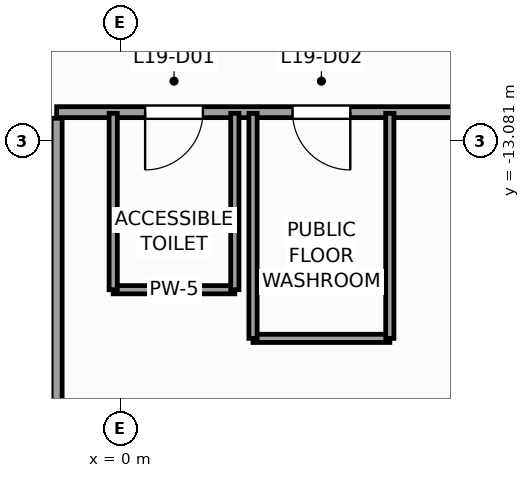
"""IFC4 building model, lengths in metres.
Left out: names, types, materials, properties, quantities, classifications, styles, units other than length and angle.
Written with IfcOpenShell. Run it as: python <this file> out.ifc"""

import sys

from ifc_helpers import new_model, si_unit, direction, frame, frame_2d, origin, place, context, subcontext, project, spatial, rectangle, extrude, source, transform, mapped, element, fill, save


model = new_model("IFC4")
c1 = context("Model", 3, precision=1e-05, world=origin(), true_north=direction((0.0, 1.0)))
c2 = subcontext(c1, "Body", "Model", "MODEL_VIEW")
j1 = project(units=[si_unit("LENGTHUNIT", "METRE"), si_unit("PLANEANGLEUNIT", "RADIAN")], contexts=[c1])
p1 = place(None, origin())
s1 = spatial("IfcSite", under=j1, at=p1, CompositionType="ELEMENT")
p2 = place(p1, origin())
s2 = spatial("IfcBuilding", under=s1, at=p2, CompositionType="ELEMENT")
p3 = place(p2, frame((0.0, 0.0, 83.2)))
s3 = spatial("IfcBuildingStorey", under=s2, at=p3, CompositionType="ELEMENT", Elevation=83.2)
p4 = place(p3, frame((-1.05, -12.6, 0.0), z_axis=(0.0, 0.0, 1.0), x_axis=(1.0, 0.0, 0.0)))
e1 = element("IfcWall", 1, at=p4, inside=s3, PredefinedType="PARTITIONING", context=c2, shape_type="SweptSolid", body=[
    extrude(rectangle(XDim=11.5, YDim=0.18, at=frame_2d((5.75, 0.0))), origin(), (0.0, 0.0, 1.0), 3.74),
])
p5 = place(p4, frame((1.455, 0.0, 0.0)))
e2 = element("IfcOpeningElement", 2, at=p5, cuts=e1, PredefinedType="OPENING", context=c2, shape_type="SweptSolid", body=[
    extrude(rectangle(XDim=0.95, YDim=2.1, at=frame_2d((0.475, 1.05))), frame((0.0, 0.1, 0.0), z_axis=(0.0, -1.0, 0.0), x_axis=(1.0, 0.0, 0.0)), (0.0, 0.0, 1.0), 0.2),
])
p6 = place(p4, frame((3.879, 0.0, 0.0)))
e3 = element("IfcOpeningElement", 3, at=p6, cuts=e1, PredefinedType="OPENING", context=c2, shape_type="SweptSolid", body=[
    extrude(rectangle(XDim=0.95, YDim=2.1, at=frame_2d((0.475, 1.05))), frame((0.0, 0.1, 0.0), z_axis=(0.0, -1.0, 0.0), x_axis=(1.0, 0.0, 0.0)), (0.0, 0.0, 1.0), 0.2),
])
p7 = place(p3, frame((-1.05, -28.487, 0.0), z_axis=(0.0, 0.0, 1.0), x_axis=(0.0, 1.0, 0.0)))
e4 = element("IfcWall", 4, at=p7, inside=s3, PredefinedType="PARTITIONING", context=c2, shape_type="SweptSolid", body=[
    extrude(rectangle(XDim=15.787, YDim=0.18, at=frame_2d((7.894, 0.0))), origin(), (0.0, 0.0, 1.0), 3.74),
])
p8 = place(p3, frame((-0.12, -15.52, 0.0), z_axis=(0.0, 0.0, 1.0), x_axis=(1.0, 0.0, 0.0)))
e5 = element("IfcWall", 5, at=p8, inside=s3, PredefinedType="PARTITIONING", context=c2, shape_type="SweptSolid", body=[
    extrude(rectangle(XDim=2.0, YDim=0.135, at=frame_2d((1.0, 0.0))), origin(), (0.0, 0.0, 1.0), 3.24),
])
for number, where, z_axis, x_axis in (
    (6, (1.88, -15.52, 0.0), (0.0, 0.0, 1.0), (0.0, 1.0, 0.0)),
    (7, (-0.12, -15.52, 0.0), (0.0, 0.0, 1.0), (0.0, 1.0, 0.0)),
):
    element("IfcWall", number, at=place(p3, frame(where, z_axis=z_axis, x_axis=x_axis)), inside=s3, PredefinedType="PARTITIONING", context=c2, shape_type="SweptSolid", body=[
        extrude(rectangle(XDim=2.9, YDim=0.135, at=frame_2d((1.45, 0.0))), origin(), (0.0, 0.0, 1.0), 3.74),
    ])
p9 = place(p3, frame((2.179, -16.32, 0.0), z_axis=(0.0, 0.0, 1.0), x_axis=(1.0, 0.0, 0.0)))
e8 = element("IfcWall", 8, at=p9, inside=s3, PredefinedType="PARTITIONING", context=c2, shape_type="SweptSolid", body=[
    extrude(rectangle(XDim=2.25, YDim=0.135, at=frame_2d((1.125, 0.0))), origin(), (0.0, 0.0, 1.0), 3.74),
])
for number, where, z_axis, x_axis in (
    (9, (4.429, -16.32, 0.0), (0.0, 0.0, 1.0), (0.0, 1.0, 0.0)),
    (10, (2.179, -16.32, 0.0), (0.0, 0.0, 1.0), (0.0, 1.0, 0.0)),
):
    element("IfcWall", number, at=place(p3, frame(where, z_axis=z_axis, x_axis=x_axis)), inside=s3, PredefinedType="PARTITIONING", context=c2, shape_type="SweptSolid", body=[
        extrude(rectangle(XDim=3.7, YDim=0.135, at=frame_2d((1.85, 0.0))), origin(), (0.0, 0.0, 1.0), 3.74),
    ])
m1 = source(origin(), c2, "Body", "SweptSolid", [
    extrude(rectangle(XDim=0.95, YDim=2.1, at=frame_2d((0.475, 1.05))), frame((0.0, 0.025, 0.0), z_axis=(0.0, -1.0, 0.0), x_axis=(1.0, 0.0, 0.0)), (0.0, 0.0, 1.0), 0.05),
])
p10 = place(p5, frame((0.95, 0.0, 0.0), z_axis=(0.0, 0.0, 1.0), x_axis=(-1.0, 0.0, 0.0)))
e11 = element("IfcDoor", 11, at=p10, inside=s3, OperationType="SINGLE_SWING_LEFT", PredefinedType="DOOR", context=c2, shape_type="MappedRepresentation", body=[
    mapped(m1, transform((0.0, 0.0, 0.0), scale=1.0)),
])
fill(e2, e11)
p11 = place(p6, frame((0.95, 0.0, 0.0), z_axis=(0.0, 0.0, 1.0), x_axis=(-1.0, 0.0, 0.0)))
e12 = element("IfcDoor", 12, at=p11, inside=s3, OperationType="SINGLE_SWING_RIGHT", PredefinedType="DOOR", context=c2, shape_type="MappedRepresentation", body=[
    mapped(m1, transform((0.0, 0.0, 0.0), scale=1.0)),
])
fill(e3, e12)
save(model, sys.argv[1])
